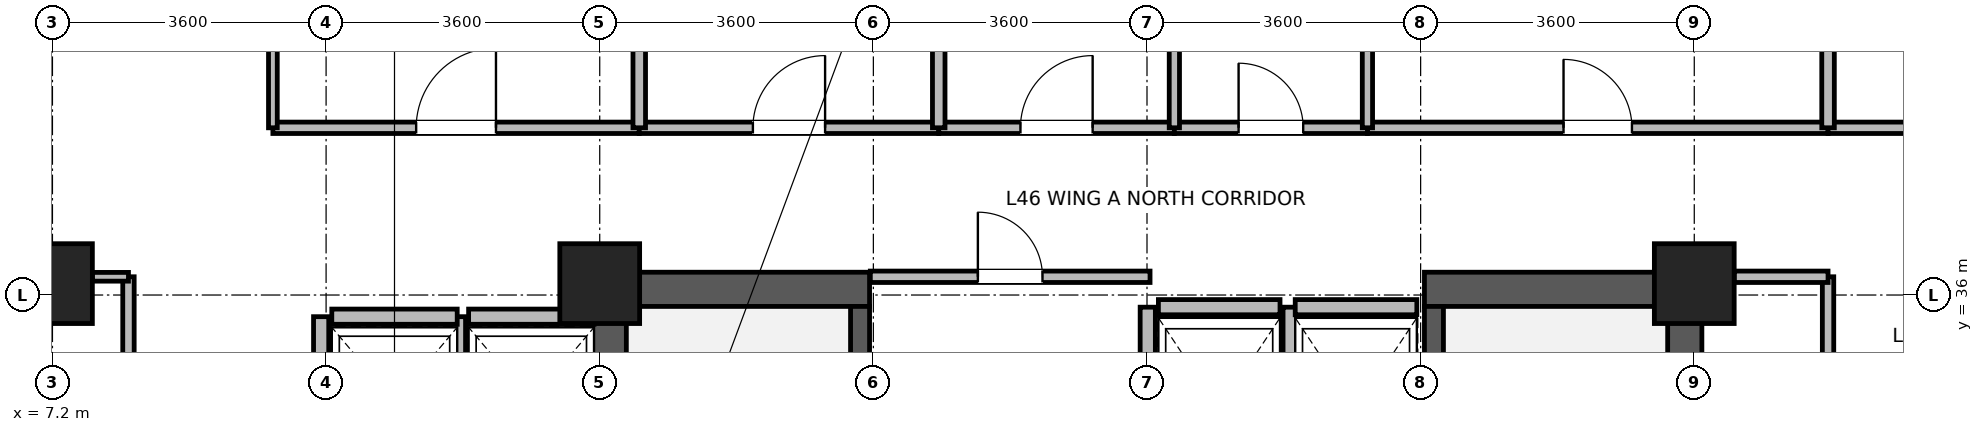
"""IFC4 building model, lengths in metres.
Left out: names, types, materials, properties, quantities, classifications, styles, units other than length and angle.
Written with IfcOpenShell. Run it as: python <this file> out.ifc"""

import sys

from ifc_helpers import new_model, si_unit, direction, frame, frame_2d, origin, origin_2d, place, context, subcontext, project, spatial, rectangle, extrude, source, transform, mapped, element, fill, save


model = new_model("IFC4")
c1 = context("Model", 3, precision=1e-05, world=origin(), true_north=direction((0.0, 1.0)))
c2 = subcontext(c1, "Body", "Model", "MODEL_VIEW")
j1 = project(units=[si_unit("LENGTHUNIT", "METRE"), si_unit("PLANEANGLEUNIT", "RADIAN")], contexts=[c1])
p1 = place(None, origin())
s1 = spatial("IfcSite", under=j1, at=p1, CompositionType="ELEMENT")
p2 = place(p1, origin())
s2 = spatial("IfcBuilding", under=s1, at=p2, CompositionType="ELEMENT")
p3 = place(p2, frame((0.0, 0.0, 180.9)))
s3 = spatial("IfcBuildingStorey", under=s2, at=p3, CompositionType="ELEMENT", Elevation=180.9)
for number, where, z_axis, x_axis in (
    (1, (14.525, 28.4, 0.0), (0.0, 0.0, 1.0), (0.0, 1.0, 0.0)),
    (2, (28.675, 28.4, 0.0), (0.0, 0.0, 1.0), (0.0, 1.0, 0.0)),
):
    element("IfcWall", number, at=place(p3, frame(where, z_axis=z_axis, x_axis=x_axis)), inside=s3, PredefinedType="SHEAR", context=c2, shape_type="SweptSolid", body=[
        extrude(rectangle(XDim=7.9, YDim=0.45, at=frame_2d((3.95, 0.0))), origin(), (0.0, 0.0, 1.0), 3.46),
    ])
for number, where, z_axis, x_axis in (
    (3, (14.75, 36.075, 0.0), (0.0, 0.0, 1.0), (1.0, 0.0, 0.0)),
    (4, (25.25, 36.075, 0.0), (0.0, 0.0, 1.0), (1.0, 0.0, 0.0)),
):
    element("IfcWall", number, at=place(p3, frame(where, z_axis=z_axis, x_axis=x_axis)), inside=s3, PredefinedType="SHEAR", context=c2, shape_type="SweptSolid", body=[
        extrude(rectangle(XDim=3.2, YDim=0.45, at=frame_2d((1.6, 0.0))), origin(), (0.0, 0.0, 1.0), 3.46),
    ])
p4 = place(p3, frame((17.825, 28.85, 0.0), z_axis=(0.0, 0.0, 1.0), x_axis=(0.0, 1.0, 0.0)))
e5 = element("IfcWall", 5, at=p4, inside=s3, PredefinedType="SHEAR", context=c2, shape_type="SweptSolid", body=[
    extrude(rectangle(XDim=7.0, YDim=0.25, at=frame_2d((3.5, 0.0))), origin(), (0.0, 0.0, 1.0), 3.46),
])
p5 = place(p4, frame((0.15, 0.0, 0.0)))
e6 = element("IfcOpeningElement", 6, at=p5, cuts=e5, PredefinedType="OPENING", context=c2, shape_type="SweptSolid", body=[
    extrude(rectangle(XDim=1.1, YDim=2.08, at=frame_2d((0.55, 1.04))), frame((0.0, 0.135, 0.0), z_axis=(0.0, -1.0, 0.0), x_axis=(1.0, 0.0, 0.0)), (0.0, 0.0, 1.0), 0.27),
])
p6 = place(p3, frame((25.375, 28.85, 0.0), z_axis=(0.0, 0.0, 1.0), x_axis=(0.0, 1.0, 0.0)))
e7 = element("IfcWall", 7, at=p6, inside=s3, PredefinedType="SHEAR", context=c2, shape_type="SweptSolid", body=[
    extrude(rectangle(XDim=7.0, YDim=0.25, at=frame_2d((3.5, 0.0))), origin(), (0.0, 0.0, 1.0), 3.46),
])
p7 = place(p6, frame((0.15, 0.0, 0.0)))
e8 = element("IfcOpeningElement", 8, at=p7, cuts=e7, PredefinedType="OPENING", context=c2, shape_type="SweptSolid", body=[
    extrude(rectangle(XDim=1.1, YDim=2.08, at=frame_2d((0.55, 1.04))), frame((0.0, 0.135, 0.0), z_axis=(0.0, -1.0, 0.0), x_axis=(1.0, 0.0, 0.0)), (0.0, 0.0, 1.0), 0.27),
])
m1 = source(origin(), c2, "Body", "SweptSolid", [
    extrude(rectangle(XDim=1.05, YDim=1.05, at=origin_2d()), origin(), (0.0, 0.0, 1.0), 3.7),
])
for number, where, z_axis, x_axis in (
    (9, (7.2, 36.15, 0.0), (0.0, 0.0, 1.0), (1.0, 0.0, 0.0)),
    (10, (14.4, 36.15, 0.0), (0.0, 0.0, 1.0), (1.0, 0.0, 0.0)),
    (11, (28.8, 36.15, 0.0), (0.0, 0.0, 1.0), (1.0, 0.0, 0.0)),
):
    element("IfcColumn", number, at=place(p3, frame(where, z_axis=z_axis, x_axis=x_axis)), inside=s3, PredefinedType="COLUMN", context=c2, shape_type="MappedRepresentation", body=[
        mapped(m1, transform((0.0, 0.0, 0.0), x_axis=(1.0, 0.0, 0.0), y_axis=(0.0, 1.0, 0.0), z_axis=(0.0, 0.0, 1.0), scale=1.0)),
    ])
p8 = place(p3, frame((12.675, 35.715, 0.0), z_axis=(0.0, 0.0, 1.0), x_axis=(1.0, 0.0, 0.0)))
e12 = element("IfcWall", 12, at=p8, inside=s3, PredefinedType="PARTITIONING", context=c2, shape_type="SweptSolid", body=[
    extrude(rectangle(XDim=1.65, YDim=0.2, at=frame_2d((0.825, 0.0))), origin(), (0.0, 0.0, 1.0), 3.44),
])
p9 = place(p3, frame((12.535, 33.485, 0.0), z_axis=(0.0, 0.0, 1.0), x_axis=(0.0, 1.0, 0.0)))
e13 = element("IfcWall", 13, at=p9, inside=s3, PredefinedType="PARTITIONING", context=c2, shape_type="SweptSolid", body=[
    extrude(rectangle(XDim=2.23, YDim=0.2, at=frame_2d((1.115, 0.0))), origin(), (0.0, 0.0, 1.0), 3.44),
])
p10 = place(p3, frame((10.875, 35.715, 0.0), z_axis=(0.0, 0.0, 1.0), x_axis=(1.0, 0.0, 0.0)))
e14 = element("IfcWall", 14, at=p10, inside=s3, PredefinedType="PARTITIONING", context=c2, shape_type="SweptSolid", body=[
    extrude(rectangle(XDim=1.65, YDim=0.2, at=frame_2d((0.825, 0.0))), origin(), (0.0, 0.0, 1.0), 3.44),
])
p11 = place(p3, frame((10.735, 33.485, 0.0), z_axis=(0.0, 0.0, 1.0), x_axis=(0.0, 1.0, 0.0)))
e15 = element("IfcWall", 15, at=p11, inside=s3, PredefinedType="PARTITIONING", context=c2, shape_type="SweptSolid", body=[
    extrude(rectangle(XDim=2.23, YDim=0.2, at=frame_2d((1.115, 0.0))), origin(), (0.0, 0.0, 1.0), 3.44),
])
p12 = place(p3, frame((21.75, 35.84, 0.0), z_axis=(0.0, 0.0, 1.0), x_axis=(1.0, 0.0, 0.0)))
e16 = element("IfcWall", 16, at=p12, inside=s3, PredefinedType="PARTITIONING", context=c2, shape_type="SweptSolid", body=[
    extrude(rectangle(XDim=1.6, YDim=0.2, at=frame_2d((0.8, 0.0))), origin(), (0.0, 0.0, 1.0), 2.44),
])
for number, where, z_axis, x_axis in (
    (17, (21.61, 33.16, 0.0), (0.0, 0.0, 1.0), (0.0, 1.0, 0.0)),
    (18, (23.49, 33.16, 0.0), (0.0, 0.0, 1.0), (0.0, 1.0, 0.0)),
):
    element("IfcWall", number, at=place(p3, frame(where, z_axis=z_axis, x_axis=x_axis)), inside=s3, PredefinedType="PARTITIONING", context=c2, shape_type="SweptSolid", body=[
        extrude(rectangle(XDim=2.68, YDim=0.2, at=frame_2d((1.34, 0.0))), origin(), (0.0, 0.0, 1.0), 3.44),
    ])
p13 = place(p3, frame((23.55, 35.84, 0.0), z_axis=(0.0, 0.0, 1.0), x_axis=(1.0, 0.0, 0.0)))
e19 = element("IfcWall", 19, at=p13, inside=s3, PredefinedType="PARTITIONING", context=c2, shape_type="SweptSolid", body=[
    extrude(rectangle(XDim=1.6, YDim=0.2, at=frame_2d((0.8, 0.0))), origin(), (0.0, 0.0, 1.0), 2.44),
])
p14 = place(p3, frame((24.5, 38.2, 0.0), z_axis=(0.0, 0.0, 1.0), x_axis=(1.0, 0.0, 0.0)))
e20 = element("IfcWall", 20, at=p14, inside=s3, PredefinedType="PARTITIONING", context=c2, shape_type="SweptSolid", body=[
    extrude(rectangle(XDim=6.06, YDim=0.15, at=frame_2d((3.03, 0.0))), origin(), (0.0, 0.0, 1.0), 3.44),
])
p15 = place(p14, frame((2.58, 0.0, 0.0)))
e21 = element("IfcOpeningElement", 21, at=p15, cuts=e20, PredefinedType="OPENING", context=c2, shape_type="SweptSolid", body=[
    extrude(rectangle(XDim=0.9, YDim=2.08, at=frame_2d((0.45, 1.04))), frame((0.0, 0.085, 0.0), z_axis=(0.0, -1.0, 0.0), x_axis=(1.0, 0.0, 0.0)), (0.0, 0.0, 1.0), 0.17),
])
p16 = place(p3, frame((10.1, 38.2, 0.0), z_axis=(0.0, 0.0, 1.0), x_axis=(1.0, 0.0, 0.0)))
e22 = element("IfcWall", 22, at=p16, inside=s3, PredefinedType="PARTITIONING", context=c2, shape_type="SweptSolid", body=[
    extrude(rectangle(XDim=4.82, YDim=0.15, at=frame_2d((2.41, 0.0))), origin(), (0.0, 0.0, 1.0), 3.44),
])
p17 = place(p16, frame((1.885, 0.0, 0.0)))
e23 = element("IfcOpeningElement", 23, at=p17, cuts=e22, PredefinedType="OPENING", context=c2, shape_type="SweptSolid", body=[
    extrude(rectangle(XDim=1.05, YDim=2.12, at=frame_2d((0.525, 1.06))), frame((0.0, 0.085, 0.0), z_axis=(0.0, -1.0, 0.0), x_axis=(1.0, 0.0, 0.0)), (0.0, 0.0, 1.0), 0.17),
])
p18 = place(p3, frame((30.56, 38.2, 0.0), z_axis=(0.0, 0.0, 1.0), x_axis=(1.0, 0.0, 0.0)))
e24 = element("IfcWall", 24, at=p18, inside=s3, PredefinedType="PARTITIONING", context=c2, shape_type="SweptSolid", body=[
    extrude(rectangle(XDim=4.8, YDim=0.15, at=frame_2d((2.4, 0.0))), origin(), (0.0, 0.0, 1.0), 3.44),
])
p19 = place(p18, frame((1.75, 0.0, 0.0)))
e25 = element("IfcOpeningElement", 25, at=p19, cuts=e24, PredefinedType="OPENING", context=c2, shape_type="SweptSolid", body=[
    extrude(rectangle(XDim=1.3, YDim=2.12, at=frame_2d((0.65, 1.06))), frame((0.0, 0.085, 0.0), z_axis=(0.0, -1.0, 0.0), x_axis=(1.0, 0.0, 0.0)), (0.0, 0.0, 1.0), 0.17),
])
p20 = place(p3, frame((14.92, 38.2, 0.0), z_axis=(0.0, 0.0, 1.0), x_axis=(1.0, 0.0, 0.0)))
e26 = element("IfcWall", 26, at=p20, inside=s3, PredefinedType="PARTITIONING", context=c2, shape_type="SweptSolid", body=[
    extrude(rectangle(XDim=3.94, YDim=0.15, at=frame_2d((1.97, 0.0))), origin(), (0.0, 0.0, 1.0), 3.44),
])
p21 = place(p20, frame((1.495, 0.0, 0.0)))
e27 = element("IfcOpeningElement", 27, at=p21, cuts=e26, PredefinedType="OPENING", context=c2, shape_type="SweptSolid", body=[
    extrude(rectangle(XDim=0.95, YDim=2.1, at=frame_2d((0.475, 1.05))), frame((0.0, 0.085, 0.0), z_axis=(0.0, -1.0, 0.0), x_axis=(1.0, 0.0, 0.0)), (0.0, 0.0, 1.0), 0.17),
])
p22 = place(p3, frame((8.2, 32.4, 0.0), z_axis=(0.0, 0.0, 1.0), x_axis=(0.0, 1.0, 0.0)))
e28 = element("IfcWall", 28, at=p22, inside=s3, PredefinedType="PARTITIONING", context=c2, shape_type="SweptSolid", body=[
    extrude(rectangle(XDim=3.84, YDim=0.15, at=frame_2d((1.92, 0.0))), origin(), (0.0, 0.0, 1.0), 3.44),
])
p23 = place(p22, frame((1.27, 0.0, 0.0)))
e29 = element("IfcOpeningElement", 29, at=p23, cuts=e28, PredefinedType="OPENING", context=c2, shape_type="SweptSolid", body=[
    extrude(rectangle(XDim=1.3, YDim=2.12, at=frame_2d((0.65, 1.06))), frame((0.0, 0.085, 0.0), z_axis=(0.0, -1.0, 0.0), x_axis=(1.0, 0.0, 0.0)), (0.0, 0.0, 1.0), 0.17),
])
p24 = place(p3, frame((30.56, 32.4, 0.0), z_axis=(0.0, 0.0, 1.0), x_axis=(0.0, 1.0, 0.0)))
e30 = element("IfcWall", 30, at=p24, inside=s3, PredefinedType="PARTITIONING", context=c2, shape_type="SweptSolid", body=[
    extrude(rectangle(XDim=3.84, YDim=0.15, at=frame_2d((1.92, 0.0))), origin(), (0.0, 0.0, 1.0), 3.44),
])
p25 = place(p24, frame((1.27, 0.0, 0.0)))
e31 = element("IfcOpeningElement", 31, at=p25, cuts=e30, PredefinedType="OPENING", context=c2, shape_type="SweptSolid", body=[
    extrude(rectangle(XDim=1.3, YDim=2.12, at=frame_2d((0.65, 1.06))), frame((0.0, 0.085, 0.0), z_axis=(0.0, -1.0, 0.0), x_axis=(1.0, 0.0, 0.0)), (0.0, 0.0, 1.0), 0.17),
])
p26 = place(p3, frame((17.96, 36.24, 0.0), z_axis=(0.0, 0.0, 1.0), x_axis=(1.0, 0.0, 0.0)))
e32 = element("IfcWall", 32, at=p26, inside=s3, PredefinedType="PARTITIONING", context=c2, shape_type="SweptSolid", body=[
    extrude(rectangle(XDim=3.68, YDim=0.15, at=frame_2d((1.84, 0.0))), origin(), (0.0, 0.0, 1.0), 2.44),
])
p27 = place(p26, frame((1.415, 0.0, 0.0)))
e33 = element("IfcOpeningElement", 33, at=p27, cuts=e32, PredefinedType="OPENING", context=c2, shape_type="SweptSolid", body=[
    extrude(rectangle(XDim=0.85, YDim=2.04, at=frame_2d((0.425, 1.02))), frame((0.0, 0.085, 0.0), z_axis=(0.0, -1.0, 0.0), x_axis=(1.0, 0.0, 0.0)), (0.0, 0.0, 1.0), 0.17),
])
p28 = place(p3, frame((18.86, 38.2, 0.0), z_axis=(0.0, 0.0, 1.0), x_axis=(1.0, 0.0, 0.0)))
e34 = element("IfcWall", 34, at=p28, inside=s3, PredefinedType="PARTITIONING", context=c2, shape_type="SweptSolid", body=[
    extrude(rectangle(XDim=3.1, YDim=0.15, at=frame_2d((1.55, 0.0))), origin(), (0.0, 0.0, 1.0), 3.44),
])
p29 = place(p28, frame((1.075, 0.0, 0.0)))
e35 = element("IfcOpeningElement", 35, at=p29, cuts=e34, PredefinedType="OPENING", context=c2, shape_type="SweptSolid", body=[
    extrude(rectangle(XDim=0.95, YDim=2.1, at=frame_2d((0.475, 1.05))), frame((0.0, 0.085, 0.0), z_axis=(0.0, -1.0, 0.0), x_axis=(1.0, 0.0, 0.0)), (0.0, 0.0, 1.0), 0.17),
])
p30 = place(p3, frame((21.96, 38.2, 0.0), z_axis=(0.0, 0.0, 1.0), x_axis=(1.0, 0.0, 0.0)))
e36 = element("IfcWall", 36, at=p30, inside=s3, PredefinedType="PARTITIONING", context=c2, shape_type="SweptSolid", body=[
    extrude(rectangle(XDim=2.54, YDim=0.15, at=frame_2d((1.27, 0.0))), origin(), (0.0, 0.0, 1.0), 3.44),
])
p31 = place(p30, frame((0.845, 0.0, 0.0)))
e37 = element("IfcOpeningElement", 37, at=p31, cuts=e36, PredefinedType="OPENING", context=c2, shape_type="SweptSolid", body=[
    extrude(rectangle(XDim=0.85, YDim=2.04, at=frame_2d((0.425, 1.02))), frame((0.0, 0.085, 0.0), z_axis=(0.0, -1.0, 0.0), x_axis=(1.0, 0.0, 0.0)), (0.0, 0.0, 1.0), 0.17),
])
p32 = place(p3, frame((29.325, 36.24, 0.0), z_axis=(0.0, 0.0, 1.0), x_axis=(1.0, 0.0, 0.0)))
e38 = element("IfcWall", 38, at=p32, inside=s3, PredefinedType="PARTITIONING", context=c2, shape_type="SweptSolid", body=[
    extrude(rectangle(XDim=1.235, YDim=0.15, at=frame_2d((0.618, 0.0))), origin(), (0.0, 0.0, 1.0), 2.84),
])
p33 = place(p3, frame((7.725, 36.24, 0.0), z_axis=(0.0, 0.0, 1.0), x_axis=(1.0, 0.0, 0.0)))
e39 = element("IfcWall", 39, at=p33, inside=s3, PredefinedType="PARTITIONING", context=c2, shape_type="SweptSolid", body=[
    extrude(rectangle(XDim=0.475, YDim=0.115, at=frame_2d((0.237, 0.0))), origin(), (0.0, 0.0, 1.0), 2.84),
])
for number, where, z_axis, x_axis in (
    (40, (14.92, 38.2, 0.0), (0.0, 0.0, 1.0), (0.0, 1.0, 0.0)),
    (41, (18.86, 38.2, 0.0), (0.0, 0.0, 1.0), (0.0, 1.0, 0.0)),
):
    element("IfcWall", number, at=place(p3, frame(where, z_axis=z_axis, x_axis=x_axis)), inside=s3, PredefinedType="PARTITIONING", context=c2, shape_type="SweptSolid", body=[
        extrude(rectangle(XDim=4.868, YDim=0.165, at=frame_2d((2.434, 0.0))), origin(), (0.0, 0.0, 1.0), 3.44),
    ])
for number, where, z_axis, x_axis in (
    (42, (21.96, 38.2, 0.0), (0.0, 0.0, 1.0), (0.0, 1.0, 0.0)),
    (43, (24.5, 38.2, 0.0), (0.0, 0.0, 1.0), (0.0, 1.0, 0.0)),
):
    element("IfcWall", number, at=place(p3, frame(where, z_axis=z_axis, x_axis=x_axis)), inside=s3, PredefinedType="PARTITIONING", context=c2, shape_type="SweptSolid", body=[
        extrude(rectangle(XDim=4.868, YDim=0.135, at=frame_2d((2.434, 0.0))), origin(), (0.0, 0.0, 1.0), 3.44),
    ])
p34 = place(p3, frame((30.56, 38.2, 0.0), z_axis=(0.0, 0.0, 1.0), x_axis=(0.0, 1.0, 0.0)))
e44 = element("IfcWall", 44, at=p34, inside=s3, PredefinedType="PARTITIONING", context=c2, shape_type="SweptSolid", body=[
    extrude(rectangle(XDim=4.868, YDim=0.165, at=frame_2d((2.434, 0.0))), origin(), (0.0, 0.0, 1.0), 3.44),
])
p35 = place(p3, frame((10.1, 38.2, 0.0), z_axis=(0.0, 0.0, 1.0), x_axis=(0.0, 1.0, 0.0)))
e45 = element("IfcWall", 45, at=p35, inside=s3, PredefinedType="PARTITIONING", context=c2, shape_type="SweptSolid", body=[
    extrude(rectangle(XDim=1.268, YDim=0.115, at=frame_2d((0.634, 0.0))), origin(), (0.0, 0.0, 1.0), 3.44),
])
p36 = place(p15, origin())
e46 = element("IfcDoor", 46, at=p36, inside=s3, OperationType="SINGLE_SWING_LEFT", PredefinedType="DOOR", context=c2, shape_type="SweptSolid", body=[
    extrude(rectangle(XDim=0.9, YDim=2.08, at=frame_2d((0.45, 1.04))), frame((0.0, 0.025, 0.0), z_axis=(0.0, -1.0, 0.0), x_axis=(1.0, 0.0, 0.0)), (0.0, 0.0, 1.0), 0.05),
])
fill(e21, e46)
p37 = place(p17, origin())
e47 = element("IfcDoor", 47, at=p37, inside=s3, OperationType="SINGLE_SWING_RIGHT", PredefinedType="DOOR", context=c2, shape_type="SweptSolid", body=[
    extrude(rectangle(XDim=1.05, YDim=2.12, at=frame_2d((0.525, 1.06))), frame((0.0, 0.025, 0.0), z_axis=(0.0, -1.0, 0.0), x_axis=(1.0, 0.0, 0.0)), (0.0, 0.0, 1.0), 0.05),
])
fill(e23, e47)
p38 = place(p21, origin())
e48 = element("IfcDoor", 48, at=p38, inside=s3, OperationType="SINGLE_SWING_RIGHT", PredefinedType="DOOR", context=c2, shape_type="SweptSolid", body=[
    extrude(rectangle(XDim=0.95, YDim=2.1, at=frame_2d((0.475, 1.05))), frame((0.0, 0.025, 0.0), z_axis=(0.0, -1.0, 0.0), x_axis=(1.0, 0.0, 0.0)), (0.0, 0.0, 1.0), 0.05),
])
fill(e27, e48)
p39 = place(p27, origin())
e49 = element("IfcDoor", 49, at=p39, inside=s3, OperationType="SINGLE_SWING_LEFT", PredefinedType="DOOR", context=c2, shape_type="SweptSolid", body=[
    extrude(rectangle(XDim=0.85, YDim=2.04, at=frame_2d((0.425, 1.02))), frame((0.0, 0.025, 0.0), z_axis=(0.0, -1.0, 0.0), x_axis=(1.0, 0.0, 0.0)), (0.0, 0.0, 1.0), 0.05),
])
fill(e33, e49)
p40 = place(p29, origin())
e50 = element("IfcDoor", 50, at=p40, inside=s3, OperationType="SINGLE_SWING_RIGHT", PredefinedType="DOOR", context=c2, shape_type="SweptSolid", body=[
    extrude(rectangle(XDim=0.95, YDim=2.1, at=frame_2d((0.475, 1.05))), frame((0.0, 0.025, 0.0), z_axis=(0.0, -1.0, 0.0), x_axis=(1.0, 0.0, 0.0)), (0.0, 0.0, 1.0), 0.05),
])
fill(e35, e50)
p41 = place(p31, origin())
e51 = element("IfcDoor", 51, at=p41, inside=s3, OperationType="SINGLE_SWING_LEFT", PredefinedType="DOOR", context=c2, shape_type="SweptSolid", body=[
    extrude(rectangle(XDim=0.85, YDim=2.04, at=frame_2d((0.425, 1.02))), frame((0.0, 0.025, 0.0), z_axis=(0.0, -1.0, 0.0), x_axis=(1.0, 0.0, 0.0)), (0.0, 0.0, 1.0), 0.05),
])
fill(e37, e51)
save(model, sys.argv[1])
